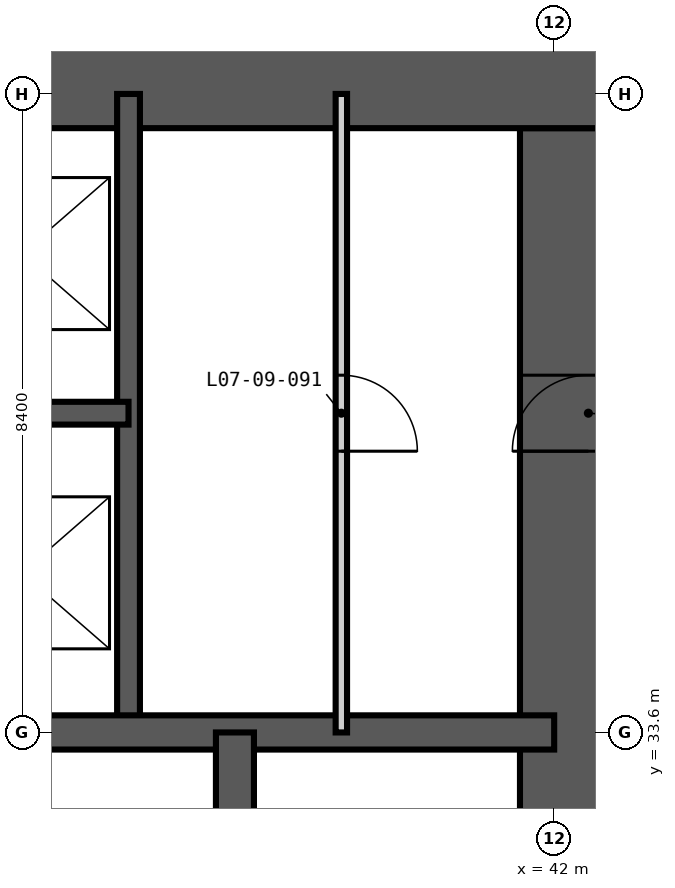
"""IFC4 building model, lengths in metres.
Left out: names, types, materials, properties, quantities, classifications, styles, units other than length and angle.
Written with IfcOpenShell. Run it as: python <this file> out.ifc"""

import sys

from ifc_helpers import new_model, si_unit, direction, frame, frame_2d, origin, place, context, subcontext, project, spatial, rectangle, extrude, element, fill, save


model = new_model("IFC4")
c1 = context("Model", 3, precision=1e-05, world=origin(), true_north=direction((0.0, 1.0)))
c2 = subcontext(c1, "Body", "Model", "MODEL_VIEW")
j1 = project(units=[si_unit("LENGTHUNIT", "METRE"), si_unit("PLANEANGLEUNIT", "RADIAN")], contexts=[c1])
p1 = place(None, origin())
s1 = spatial("IfcSite", under=j1, at=p1, CompositionType="ELEMENT")
p2 = place(p1, origin())
s2 = spatial("IfcBuilding", under=s1, at=p2, CompositionType="ELEMENT")
p3 = place(p2, frame((0.0, 0.0, 34.2)))
s3 = spatial("IfcBuildingStorey", under=s2, at=p3, CompositionType="ELEMENT", Elevation=34.2)
p4 = place(p3, frame((42.45, 17.25, -0.35), z_axis=(0.0, 0.0, 1.0), x_axis=(0.0, 1.0, 0.0)))
e1 = element("IfcWall", 1, at=p4, inside=s3, PredefinedType="SHEAR", context=c2, shape_type="SweptSolid", body=[
    extrude(rectangle(XDim=24.3, YDim=1.8, at=frame_2d((12.15, 0.0))), origin(), (0.0, 0.0, 1.0), 3.6),
])
p5 = place(p4, frame((0.35, 0.0, 0.35)))
e2 = element("IfcOpeningElement", 2, at=p5, cuts=e1, PredefinedType="OPENING", context=c2, shape_type="SweptSolid", body=[
    extrude(rectangle(XDim=1.2, YDim=2.2, at=frame_2d((0.6, 1.1))), frame((0.0, 0.91, 0.0), z_axis=(0.0, -1.0, 0.0), x_axis=(1.0, 0.0, 0.0)), (0.0, 0.0, 1.0), 1.82),
])
p6 = place(p4, frame((11.65, 0.0, 0.35)))
e3 = element("IfcOpeningElement", 3, at=p6, cuts=e1, PredefinedType="OPENING", context=c2, shape_type="SweptSolid", body=[
    extrude(rectangle(XDim=1.0, YDim=2.1, at=frame_2d((0.5, 1.05))), frame((0.0, 0.91, 0.0), z_axis=(0.0, -1.0, 0.0), x_axis=(1.0, 0.0, 0.0)), (0.0, 0.0, 1.0), 1.82),
])
p7 = place(p4, frame((20.05, 0.0, 0.35)))
e4 = element("IfcOpeningElement", 4, at=p7, cuts=e1, PredefinedType="OPENING", context=c2, shape_type="SweptSolid", body=[
    extrude(rectangle(XDim=1.0, YDim=2.1, at=frame_2d((0.5, 1.05))), frame((0.0, 0.91, 0.0), z_axis=(0.0, -1.0, 0.0), x_axis=(1.0, 0.0, 0.0)), (0.0, 0.0, 1.0), 1.82),
])
p8 = place(p3, frame((43.35, 42.45, -0.35), z_axis=(0.0, 0.0, 1.0), x_axis=(-1.0, 0.0, 0.0)))
e5 = element("IfcWall", 5, at=p8, inside=s3, PredefinedType="SHEAR", context=c2, shape_type="SweptSolid", body=[
    extrude(rectangle(XDim=27.9, YDim=1.8, at=frame_2d((13.95, 0.0))), origin(), (0.0, 0.0, 1.0), 3.6),
])
p9 = place(p8, frame((21.85, 0.0, 0.35)))
e6 = element("IfcOpeningElement", 6, at=p9, cuts=e5, PredefinedType="OPENING", context=c2, shape_type="SweptSolid", body=[
    extrude(rectangle(XDim=1.0, YDim=2.1, at=frame_2d((0.5, 1.05))), frame((0.0, 0.91, 0.0), z_axis=(0.0, -1.0, 0.0), x_axis=(1.0, 0.0, 0.0)), (0.0, 0.0, 1.0), 1.82),
])
p10 = place(p8, frame((11.25, 0.0, 0.35)))
e7 = element("IfcOpeningElement", 7, at=p10, cuts=e5, PredefinedType="OPENING", context=c2, shape_type="SweptSolid", body=[
    extrude(rectangle(XDim=1.2, YDim=2.2, at=frame_2d((0.6, 1.1))), frame((0.0, 0.91, 0.0), z_axis=(0.0, -1.0, 0.0), x_axis=(1.0, 0.0, 0.0)), (0.0, 0.0, 1.0), 1.82),
])
p11 = place(p3, frame((36.4, 33.6, -0.35), z_axis=(0.0, 0.0, 1.0), x_axis=(0.0, 1.0, 0.0)))
e8 = element("IfcWall", 8, at=p11, inside=s3, PredefinedType="SHEAR", context=c2, shape_type="SweptSolid", body=[
    extrude(rectangle(XDim=8.4, YDim=0.3, at=frame_2d((4.2, 0.0))), origin(), (0.0, 0.0, 1.0), 3.6),
])
p12 = place(p3, frame((33.6, 37.8, -0.35), z_axis=(0.0, 0.0, 1.0), x_axis=(1.0, 0.0, 0.0)))
e9 = element("IfcWall", 9, at=p12, inside=s3, PredefinedType="SHEAR", context=c2, shape_type="SweptSolid", body=[
    extrude(rectangle(XDim=2.8, YDim=0.3, at=frame_2d((1.4, 0.0))), origin(), (0.0, 0.0, 1.0), 3.6),
])
p13 = place(p3, frame((16.8, 33.6, -0.35), z_axis=(0.0, 0.0, 1.0), x_axis=(1.0, 0.0, 0.0)))
e10 = element("IfcWall", 10, at=p13, inside=s3, PredefinedType="SHEAR", context=c2, shape_type="SweptSolid", body=[
    extrude(rectangle(XDim=25.2, YDim=0.45, at=frame_2d((12.6, 0.0))), origin(), (0.0, 0.0, 1.0), 3.6),
])
p14 = place(p3, frame((37.8, 30.8, -0.35), z_axis=(0.0, 0.0, 1.0), x_axis=(0.0, 1.0, 0.0)))
e11 = element("IfcWall", 11, at=p14, inside=s3, PredefinedType="SHEAR", context=c2, shape_type="SweptSolid", body=[
    extrude(rectangle(XDim=2.8, YDim=0.5, at=frame_2d((1.4, 0.0))), origin(), (0.0, 0.0, 1.0), 3.6),
])
p15 = place(p3, frame((39.2, 33.6, 0.0), z_axis=(0.0, 0.0, 1.0), x_axis=(0.0, 1.0, 0.0)))
e12 = element("IfcWall", 12, at=p15, inside=s3, PredefinedType="PARTITIONING", context=c2, shape_type="SweptSolid", body=[
    extrude(rectangle(XDim=8.4, YDim=0.15, at=frame_2d((4.2, 0.0))), origin(), (0.0, 0.0, 1.0), 3.25),
])
p16 = place(p15, frame((3.7, 0.0, 0.0)))
e13 = element("IfcOpeningElement", 13, at=p16, cuts=e12, PredefinedType="OPENING", context=c2, shape_type="SweptSolid", body=[
    extrude(rectangle(XDim=1.0, YDim=2.1, at=frame_2d((0.5, 1.05))), frame((0.0, 0.085, 0.0), z_axis=(0.0, -1.0, 0.0), x_axis=(1.0, 0.0, 0.0)), (0.0, 0.0, 1.0), 0.17),
])
p17 = place(p7, origin())
e14 = element("IfcDoor", 14, at=p17, inside=s3, OperationType="SINGLE_SWING_LEFT", PredefinedType="DOOR", context=c2, shape_type="SweptSolid", body=[
    extrude(rectangle(XDim=1.0, YDim=2.1, at=frame_2d((0.5, 1.05))), frame((0.0, 0.025, 0.0), z_axis=(0.0, -1.0, 0.0), x_axis=(1.0, 0.0, 0.0)), (0.0, 0.0, 1.0), 0.05),
])
fill(e4, e14)
p18 = place(p16, frame((1.0, 0.0, 0.0), z_axis=(0.0, 0.0, 1.0), x_axis=(-1.0, 0.0, 0.0)))
e15 = element("IfcDoor", 15, at=p18, inside=s3, OperationType="SINGLE_SWING_RIGHT", PredefinedType="DOOR", context=c2, shape_type="SweptSolid", body=[
    extrude(rectangle(XDim=1.0, YDim=2.1, at=frame_2d((0.5, 1.05))), frame((0.0, 0.025, 0.0), z_axis=(0.0, -1.0, 0.0), x_axis=(1.0, 0.0, 0.0)), (0.0, 0.0, 1.0), 0.05),
])
fill(e13, e15)
save(model, sys.argv[1])
